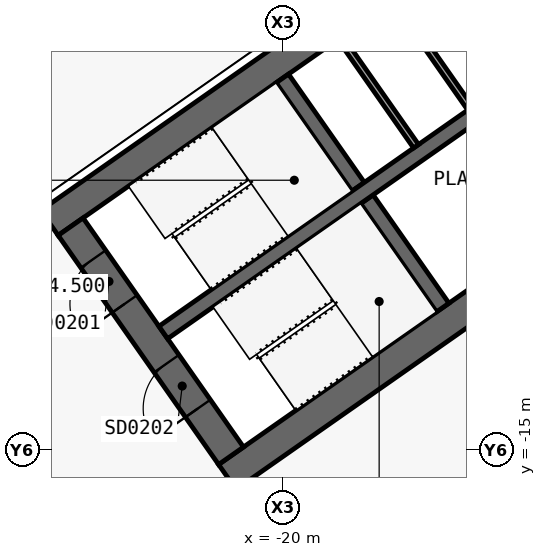
"""IFC4 building model, lengths in metres.
Left out: names, types, materials, properties, quantities, classifications, styles, units other than length and angle.
Written with IfcOpenShell. Run it as: python <this file> out.ifc"""

import sys

from ifc_helpers import new_model, si_unit, direction, frame, frame_2d, origin, place, context, subcontext, project, spatial, polyline, rectangle, outline, extrude, element, fill, save


model = new_model("IFC4")
c1 = context("Model", 3, precision=1e-05, world=origin(), true_north=direction((0.0, 1.0)))
c2 = subcontext(c1, "Body", "Model", "MODEL_VIEW")
j1 = project(units=[si_unit("LENGTHUNIT", "METRE"), si_unit("PLANEANGLEUNIT", "RADIAN")], contexts=[c1])
p1 = place(None, origin())
s1 = spatial("IfcSite", under=j1, at=p1, CompositionType="ELEMENT")
p2 = place(p1, origin())
s2 = spatial("IfcBuilding", under=s1, at=p2, CompositionType="ELEMENT")
p3 = place(p2, frame((0.0, 0.0, -4.5)))
s3 = spatial("IfcBuildingStorey", under=s2, at=p3, CompositionType="ELEMENT", Elevation=-4.5)
p4 = place(p3, frame((0.037, 11.867, 0.0), z_axis=(0.0, 0.0, 1.0), x_axis=(-0.819155306259, -0.573571777746, 0.0)))
e1 = element("IfcWall", 1, at=p4, inside=s3, PredefinedType="SHEAR", context=c2, shape_type="SweptSolid", body=[
    extrude(outline(polyline([(33.837, 0.5), (0.7, 0.5), (0.0, -0.5), (33.837, -0.5), (33.837, 0.5)])), origin(), (0.0, 0.0, 1.0), 4.5),
])
p5 = place(p3, frame((0.037, -0.585, 0.0), z_axis=(0.0, 0.0, 1.0), x_axis=(-0.819157152511, -0.573569140985, 0.0)))
e2 = element("IfcWall", 2, at=p5, inside=s3, PredefinedType="SHEAR", context=c2, shape_type="SweptSolid", body=[
    extrude(outline(polyline([(26.695, 0.5), (0.7, 0.5), (0.0, -0.5), (26.695, -0.5), (26.695, 0.5)])), origin(), (0.0, 0.0, 1.0), 4.5),
])
p6 = place(p5, frame((3.895, 0.0, 0.0)))
e3 = element("IfcOpeningElement", 3, at=p6, cuts=e2, PredefinedType="OPENING", context=c2, shape_type="SweptSolid", body=[
    extrude(rectangle(XDim=1.2, YDim=2.1, at=frame_2d((0.6, 1.05))), frame((0.0, 0.51, 0.0), z_axis=(0.0, -1.0, 0.0), x_axis=(1.0, 0.0, 0.0)), (0.0, 0.0, 1.0), 1.02),
])
p7 = place(p5, frame((12.595, 0.0, 0.0)))
e4 = element("IfcOpeningElement", 4, at=p7, cuts=e2, PredefinedType="OPENING", context=c2, shape_type="SweptSolid", body=[
    extrude(rectangle(XDim=1.2, YDim=2.1, at=frame_2d((0.6, 1.05))), frame((0.0, 0.51, 0.0), z_axis=(0.0, -1.0, 0.0), x_axis=(1.0, 0.0, 0.0)), (0.0, 0.0, 1.0), 1.02),
])
p8 = place(p3, frame((-21.708, -15.2, 0.0), z_axis=(0.0, 0.0, 1.0), x_axis=(-0.573576324356, 0.819152122709, 0.0)))
e5 = element("IfcWall", 5, at=p8, inside=s3, PredefinedType="SHEAR", context=c2, shape_type="SweptSolid", body=[
    extrude(outline(polyline([(0.0, 0.5), (0.0, -0.5), (9.2, -0.5), (9.2, 0.5), (0.0, 0.5)])), origin(), (0.0, 0.0, 1.0), 4.5),
])
p9 = place(p8, frame((6.1, 0.0, 0.0)))
e6 = element("IfcOpeningElement", 6, at=p9, cuts=e5, PredefinedType="OPENING", context=c2, shape_type="SweptSolid", body=[
    extrude(rectangle(XDim=1.8, YDim=2.1, at=frame_2d((0.9, 1.05))), frame((0.0, 0.51, 0.0), z_axis=(0.0, -1.0, 0.0), x_axis=(1.0, 0.0, 0.0)), (0.0, 0.0, 1.0), 1.02),
])
p10 = place(p8, frame((1.9, 0.0, 0.0)))
e7 = element("IfcOpeningElement", 7, at=p10, cuts=e5, PredefinedType="OPENING", context=c2, shape_type="SweptSolid", body=[
    extrude(rectangle(XDim=1.8, YDim=2.1, at=frame_2d((0.9, 1.05))), frame((0.0, 0.51, 0.0), z_axis=(0.0, -1.0, 0.0), x_axis=(1.0, 0.0, 0.0)), (0.0, 0.0, 1.0), 1.02),
])
p11 = place(p3, frame((-14.745, -10.324, 0.0), z_axis=(0.0, 0.0, 1.0), x_axis=(-0.57356780395, 0.819158088694, 0.0)))
e8 = element("IfcWall", 8, at=p11, inside=s3, PredefinedType="SHEAR", context=c2, shape_type="SweptSolid", body=[
    extrude(outline(polyline([(4.35, 0.25), (0.0, 0.25), (0.0, -0.25), (4.35, -0.25), (4.35, 0.25)])), origin(), (0.0, 0.0, 1.0), 4.5),
])
p12 = place(p3, frame((-17.527, -6.352, 0.0), z_axis=(0.0, 0.0, 1.0), x_axis=(-0.573530143085, 0.819184457233, 0.0)))
e9 = element("IfcWall", 9, at=p12, inside=s3, PredefinedType="SHEAR", context=c2, shape_type="SweptSolid", body=[
    extrude(outline(polyline([(4.35, -0.25), (4.35, 0.25), (0.0, 0.25), (0.0, -0.25), (4.35, -0.25)])), origin(), (0.0, 0.0, 1.0), 4.5),
])
p13 = place(p3, frame((-2.638, 3.768, 0.0), z_axis=(0.0, 0.0, 1.0), x_axis=(-0.819148977158, -0.573580816643, 0.0)))
e10 = element("IfcWall", 10, at=p13, inside=s3, PredefinedType="SHEAR", context=c2, shape_type="SweptSolid", body=[
    extrude(outline(polyline([(26.0, 0.25), (0.0, 0.25), (0.0, -0.25), (26.0, -0.25), (26.0, 0.25)])), origin(), (0.0, 0.0, 1.0), 4.5),
])
p14 = place(p3, frame((-12.059, -2.523, 0.0), z_axis=(0.0, 0.0, 1.0), x_axis=(-0.573594173421, 0.819139624372, 0.0)))
e11 = element("IfcWall", 11, at=p14, inside=s3, PredefinedType="SOLIDWALL", context=c2, shape_type="SweptSolid", body=[
    extrude(rectangle(XDim=4.35, YDim=0.2, at=frame_2d((2.175, 0.0))), origin(), (0.0, 0.0, 1.0), 4.5),
])
p15 = place(p3, frame((-13.84, -3.771, 0.0), z_axis=(0.0, 0.0, 1.0), x_axis=(-0.57356780395, 0.819158088694, 0.0)))
e12 = element("IfcWall", 12, at=p15, inside=s3, PredefinedType="SOLIDWALL", context=c2, shape_type="SweptSolid", body=[
    extrude(rectangle(XDim=4.35, YDim=0.2, at=frame_2d((2.175, 0.0))), origin(), (0.0, 0.0, 1.0), 4.5),
])
p16 = place(p3, frame((-15.622, -5.018, 0.0), z_axis=(0.0, 0.0, 1.0), x_axis=(-0.573594173421, 0.819139624372, 0.0)))
e13 = element("IfcWall", 13, at=p16, inside=s3, PredefinedType="SOLIDWALL", context=c2, shape_type="SweptSolid", body=[
    extrude(rectangle(XDim=4.35, YDim=0.2, at=frame_2d((2.175, 0.0))), origin(), (0.0, 0.0, 1.0), 4.5),
])
p17 = place(p9, origin())
e14 = element("IfcDoor", 14, at=p17, inside=s3, OperationType="DOUBLE_DOOR_SINGLE_SWING", PredefinedType="DOOR", context=c2, shape_type="SweptSolid", body=[
    extrude(rectangle(XDim=1.8, YDim=2.1, at=frame_2d((0.9, 1.05))), frame((0.0, 0.025, 0.0), z_axis=(0.0, -1.0, 0.0), x_axis=(1.0, 0.0, 0.0)), (0.0, 0.0, 1.0), 0.05),
])
fill(e6, e14)
p18 = place(p10, origin())
e15 = element("IfcDoor", 15, at=p18, inside=s3, OperationType="DOUBLE_DOOR_SINGLE_SWING", PredefinedType="DOOR", context=c2, shape_type="SweptSolid", body=[
    extrude(rectangle(XDim=1.8, YDim=2.1, at=frame_2d((0.9, 1.05))), frame((0.0, 0.025, 0.0), z_axis=(0.0, -1.0, 0.0), x_axis=(1.0, 0.0, 0.0)), (0.0, 0.0, 1.0), 0.05),
])
fill(e7, e15)
save(model, sys.argv[1])
